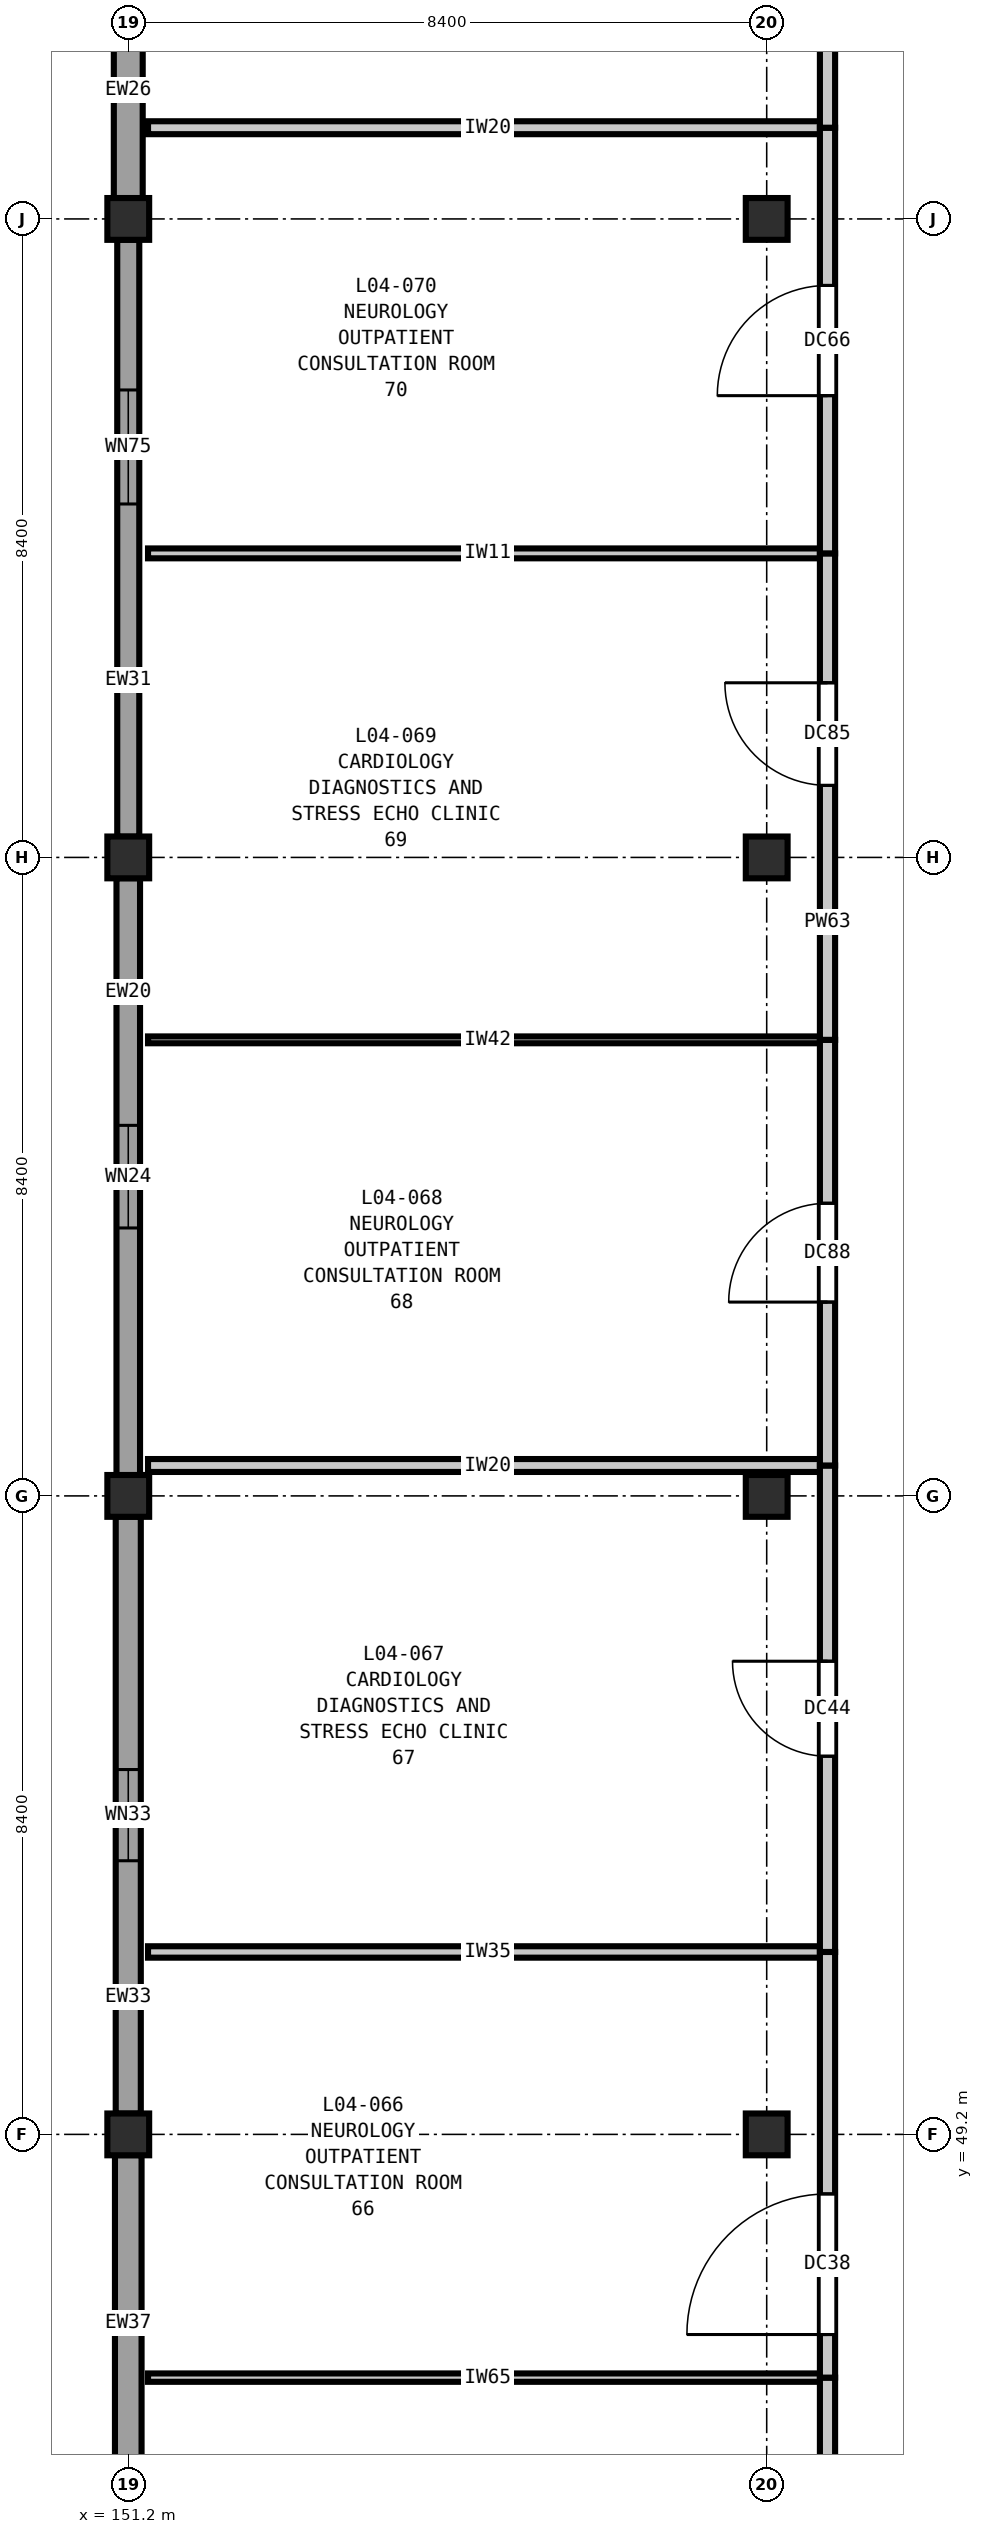
"""IFC4 building model, lengths in metres.
Left out: names, types, materials, properties, quantities, classifications, styles, units other than length and angle.
Written with IfcOpenShell. Run it as: python <this file> out.ifc"""

import sys

from ifc_helpers import new_model, si_unit, direction, frame, frame_2d, origin, origin_2d, place, context, subcontext, project, spatial, rectangle, extrude, element, fill, save


model = new_model("IFC4")
c1 = context("Model", 3, precision=1e-05, world=origin(), true_north=direction((0.0, 1.0)))
c2 = subcontext(c1, "Body", "Model", "MODEL_VIEW")
j1 = project(units=[si_unit("LENGTHUNIT", "METRE"), si_unit("PLANEANGLEUNIT", "RADIAN")], contexts=[c1])
p1 = place(None, origin())
s1 = spatial("IfcSite", under=j1, at=p1, CompositionType="ELEMENT")
p2 = place(p1, origin())
s2 = spatial("IfcBuilding", under=s1, at=p2, CompositionType="ELEMENT")
p3 = place(p2, frame((0.0, 0.0, 20.4)))
s3 = spatial("IfcBuildingStorey", under=s2, at=p3, CompositionType="ELEMENT", Elevation=20.4)
for number, where, z_axis, x_axis in (
    (1, (151.2, 49.2, 0.0), (0.0, 0.0, 1.0), (1.0, 0.0, 0.0)),
    (2, (151.2, 57.6, 0.0), (0.0, 0.0, 1.0), (1.0, 0.0, 0.0)),
    (3, (151.2, 66.0, 0.0), (0.0, 0.0, 1.0), (1.0, 0.0, 0.0)),
    (4, (151.2, 74.4, 0.0), (0.0, 0.0, 1.0), (1.0, 0.0, 0.0)),
    (5, (159.6, 49.2, 0.0), (0.0, 0.0, 1.0), (1.0, 0.0, 0.0)),
    (6, (159.6, 57.6, 0.0), (0.0, 0.0, 1.0), (1.0, 0.0, 0.0)),
    (7, (159.6, 66.0, 0.0), (0.0, 0.0, 1.0), (1.0, 0.0, 0.0)),
    (8, (159.6, 74.4, 0.0), (0.0, 0.0, 1.0), (1.0, 0.0, 0.0)),
):
    element("IfcColumn", number, at=place(p3, frame(where, z_axis=z_axis, x_axis=x_axis)), inside=s3, PredefinedType="COLUMN", context=c2, shape_type="SweptSolid", body=[
        extrude(rectangle(XDim=0.55, YDim=0.55, at=origin_2d()), origin(), (0.0, 0.0, 1.0), 4.2),
    ])
p4 = place(p3, frame((151.2, 41.073, 0.0), z_axis=(0.0, 0.0, 1.0), x_axis=(0.0, 1.0, 0.0)))
e9 = element("IfcWall", 9, at=p4, inside=s3, PredefinedType="SOLIDWALL", context=c2, shape_type="SweptSolid", body=[
    extrude(rectangle(XDim=7.854, YDim=0.35, at=frame_2d((3.927, 0.0))), origin(), (0.0, 0.0, 1.0), 3.48),
])
p5 = place(p4, frame((2.089, 0.0, 0.9)))
e10 = element("IfcOpeningElement", 10, at=p5, cuts=e9, PredefinedType="OPENING", context=c2, shape_type="SweptSolid", body=[
    extrude(rectangle(XDim=1.1, YDim=1.55, at=frame_2d((0.55, 0.775))), frame((0.0, 0.185, 0.0), z_axis=(0.0, -1.0, 0.0), x_axis=(1.0, 0.0, 0.0)), (0.0, 0.0, 1.0), 0.37),
])
p6 = place(p3, frame((151.2, 49.473, 0.0), z_axis=(0.0, 0.0, 1.0), x_axis=(0.0, 1.0, 0.0)))
e11 = element("IfcWall", 11, at=p6, inside=s3, PredefinedType="SOLIDWALL", context=c2, shape_type="SweptSolid", body=[
    extrude(rectangle(XDim=7.854, YDim=0.33, at=frame_2d((3.927, 0.0))), origin(), (0.0, 0.0, 1.0), 3.48),
])
p7 = place(p6, frame((3.327, 0.0, 0.9)))
e12 = element("IfcOpeningElement", 12, at=p7, cuts=e11, PredefinedType="OPENING", context=c2, shape_type="SweptSolid", body=[
    extrude(rectangle(XDim=1.2, YDim=1.55, at=frame_2d((0.6, 0.775))), frame((0.0, 0.175, 0.0), z_axis=(0.0, -1.0, 0.0), x_axis=(1.0, 0.0, 0.0)), (0.0, 0.0, 1.0), 0.35),
])
p8 = place(p3, frame((151.2, 57.873, 0.0), z_axis=(0.0, 0.0, 1.0), x_axis=(0.0, 1.0, 0.0)))
e13 = element("IfcWall", 13, at=p8, inside=s3, PredefinedType="SOLIDWALL", context=c2, shape_type="SweptSolid", body=[
    extrude(rectangle(XDim=7.854, YDim=0.31, at=frame_2d((3.927, 0.0))), origin(), (0.0, 0.0, 1.0), 3.48),
])
p9 = place(p8, frame((3.252, 0.0, 0.9)))
e14 = element("IfcOpeningElement", 14, at=p9, cuts=e13, PredefinedType="OPENING", context=c2, shape_type="SweptSolid", body=[
    extrude(rectangle(XDim=1.35, YDim=1.55, at=frame_2d((0.675, 0.775))), frame((0.0, 0.165, 0.0), z_axis=(0.0, -1.0, 0.0), x_axis=(1.0, 0.0, 0.0)), (0.0, 0.0, 1.0), 0.33),
])
p10 = place(p3, frame((151.2, 66.273, 0.0), z_axis=(0.0, 0.0, 1.0), x_axis=(0.0, 1.0, 0.0)))
e15 = element("IfcWall", 15, at=p10, inside=s3, PredefinedType="SOLIDWALL", context=c2, shape_type="SweptSolid", body=[
    extrude(rectangle(XDim=7.854, YDim=0.29, at=frame_2d((3.927, 0.0))), origin(), (0.0, 0.0, 1.0), 3.48),
])
p11 = place(p10, frame((4.377, 0.0, 0.9)))
e16 = element("IfcOpeningElement", 16, at=p11, cuts=e15, PredefinedType="OPENING", context=c2, shape_type="SweptSolid", body=[
    extrude(rectangle(XDim=1.5, YDim=1.55, at=frame_2d((0.75, 0.775))), frame((0.0, 0.155, 0.0), z_axis=(0.0, -1.0, 0.0), x_axis=(1.0, 0.0, 0.0)), (0.0, 0.0, 1.0), 0.31),
])
p12 = place(p3, frame((151.2, 74.673, 0.0), z_axis=(0.0, 0.0, 1.0), x_axis=(0.0, 1.0, 0.0)))
e17 = element("IfcWall", 17, at=p12, inside=s3, PredefinedType="SOLIDWALL", context=c2, shape_type="SweptSolid", body=[
    extrude(rectangle(XDim=7.854, YDim=0.38, at=frame_2d((3.927, 0.0))), origin(), (0.0, 0.0, 1.0), 3.48),
])
p13 = place(p12, frame((3.102, 0.0, 0.9)))
e18 = element("IfcOpeningElement", 18, at=p13, cuts=e17, PredefinedType="OPENING", context=c2, shape_type="SweptSolid", body=[
    extrude(rectangle(XDim=1.65, YDim=1.55, at=frame_2d((0.825, 0.775))), frame((0.0, 0.2, 0.0), z_axis=(0.0, -1.0, 0.0), x_axis=(1.0, 0.0, 0.0)), (0.0, 0.0, 1.0), 0.4),
])
p14 = place(p3, frame((151.46, 46.0, 0.0), z_axis=(0.0, 0.0, 1.0), x_axis=(1.0, 0.0, 0.0)))
e19 = element("IfcWall", 19, at=p14, inside=s3, PredefinedType="PARTITIONING", context=c2, shape_type="SweptSolid", body=[
    extrude(rectangle(XDim=8.94, YDim=0.11, at=frame_2d((4.47, 0.0))), origin(), (0.0, 0.0, 1.0), 3.82),
])
p15 = place(p3, frame((151.46, 51.6, 0.0), z_axis=(0.0, 0.0, 1.0), x_axis=(1.0, 0.0, 0.0)))
e20 = element("IfcWall", 20, at=p15, inside=s3, PredefinedType="PARTITIONING", context=c2, shape_type="SweptSolid", body=[
    extrude(rectangle(XDim=8.94, YDim=0.15, at=frame_2d((4.47, 0.0))), origin(), (0.0, 0.0, 1.0), 3.82),
])
p16 = place(p3, frame((151.46, 58.0, 0.0), z_axis=(0.0, 0.0, 1.0), x_axis=(1.0, 0.0, 0.0)))
e21 = element("IfcWall", 21, at=p16, inside=s3, PredefinedType="PARTITIONING", context=c2, shape_type="SweptSolid", body=[
    extrude(rectangle(XDim=8.94, YDim=0.17, at=frame_2d((4.47, 0.0))), origin(), (0.0, 0.0, 1.0), 3.82),
])
p17 = place(p3, frame((151.46, 63.6, 0.0), z_axis=(0.0, 0.0, 1.0), x_axis=(1.0, 0.0, 0.0)))
e22 = element("IfcWall", 22, at=p17, inside=s3, PredefinedType="PARTITIONING", context=c2, shape_type="SweptSolid", body=[
    extrude(rectangle(XDim=8.94, YDim=0.09, at=frame_2d((4.47, 0.0))), origin(), (0.0, 0.0, 1.0), 3.82),
])
p18 = place(p3, frame((151.46, 70.0, 0.0), z_axis=(0.0, 0.0, 1.0), x_axis=(1.0, 0.0, 0.0)))
e23 = element("IfcWall", 23, at=p18, inside=s3, PredefinedType="PARTITIONING", context=c2, shape_type="SweptSolid", body=[
    extrude(rectangle(XDim=8.94, YDim=0.13, at=frame_2d((4.47, 0.0))), origin(), (0.0, 0.0, 1.0), 3.82),
])
p19 = place(p3, frame((151.46, 75.6, 0.0), z_axis=(0.0, 0.0, 1.0), x_axis=(1.0, 0.0, 0.0)))
e24 = element("IfcWall", 24, at=p19, inside=s3, PredefinedType="PARTITIONING", context=c2, shape_type="SweptSolid", body=[
    extrude(rectangle(XDim=8.94, YDim=0.17, at=frame_2d((4.47, 0.0))), origin(), (0.0, 0.0, 1.0), 3.82),
])
p20 = place(p3, frame((160.4, 39.6, 0.0), z_axis=(0.0, 0.0, 1.0), x_axis=(0.0, 1.0, 0.0)))
e25 = element("IfcWall", 25, at=p20, inside=s3, PredefinedType="PARTITIONING", context=c2, shape_type="SweptSolid", body=[
    extrude(rectangle(XDim=6.4, YDim=0.2, at=frame_2d((3.2, 0.0))), origin(), (0.0, 0.0, 1.0), 3.82),
])
p21 = place(p20, frame((2.35, 0.0, 0.0)))
e26 = element("IfcOpeningElement", 26, at=p21, cuts=e25, PredefinedType="OPENING", context=c2, shape_type="SweptSolid", body=[
    extrude(rectangle(XDim=1.7, YDim=2.3, at=frame_2d((0.85, 1.15))), frame((0.0, 0.11, 0.0), z_axis=(0.0, -1.0, 0.0), x_axis=(1.0, 0.0, 0.0)), (0.0, 0.0, 1.0), 0.22),
])
p22 = place(p3, frame((160.4, 46.0, 0.0), z_axis=(0.0, 0.0, 1.0), x_axis=(0.0, 1.0, 0.0)))
e27 = element("IfcWall", 27, at=p22, inside=s3, PredefinedType="PARTITIONING", context=c2, shape_type="SweptSolid", body=[
    extrude(rectangle(XDim=5.6, YDim=0.2, at=frame_2d((2.8, 0.0))), origin(), (0.0, 0.0, 1.0), 3.82),
])
p23 = place(p22, frame((0.567, 0.0, 0.0)))
e28 = element("IfcOpeningElement", 28, at=p23, cuts=e27, PredefinedType="OPENING", context=c2, shape_type="SweptSolid", body=[
    extrude(rectangle(XDim=1.85, YDim=2.3, at=frame_2d((0.925, 1.15))), frame((0.0, 0.11, 0.0), z_axis=(0.0, -1.0, 0.0), x_axis=(1.0, 0.0, 0.0)), (0.0, 0.0, 1.0), 0.22),
])
p24 = place(p3, frame((160.4, 51.6, 0.0), z_axis=(0.0, 0.0, 1.0), x_axis=(0.0, 1.0, 0.0)))
e29 = element("IfcWall", 29, at=p24, inside=s3, PredefinedType="PARTITIONING", context=c2, shape_type="SweptSolid", body=[
    extrude(rectangle(XDim=6.4, YDim=0.2, at=frame_2d((3.2, 0.0))), origin(), (0.0, 0.0, 1.0), 3.82),
])
p25 = place(p24, frame((2.575, 0.0, 0.0)))
e30 = element("IfcOpeningElement", 30, at=p25, cuts=e29, PredefinedType="OPENING", context=c2, shape_type="SweptSolid", body=[
    extrude(rectangle(XDim=1.25, YDim=2.15, at=frame_2d((0.625, 1.075))), frame((0.0, 0.11, 0.0), z_axis=(0.0, -1.0, 0.0), x_axis=(1.0, 0.0, 0.0)), (0.0, 0.0, 1.0), 0.22),
])
p26 = place(p3, frame((160.4, 58.0, 0.0), z_axis=(0.0, 0.0, 1.0), x_axis=(0.0, 1.0, 0.0)))
e31 = element("IfcWall", 31, at=p26, inside=s3, PredefinedType="PARTITIONING", context=c2, shape_type="SweptSolid", body=[
    extrude(rectangle(XDim=5.6, YDim=0.2, at=frame_2d((2.8, 0.0))), origin(), (0.0, 0.0, 1.0), 3.82),
])
p27 = place(p26, frame((2.15, 0.0, 0.0)))
e32 = element("IfcOpeningElement", 32, at=p27, cuts=e31, PredefinedType="OPENING", context=c2, shape_type="SweptSolid", body=[
    extrude(rectangle(XDim=1.3, YDim=2.2, at=frame_2d((0.65, 1.1))), frame((0.0, 0.11, 0.0), z_axis=(0.0, -1.0, 0.0), x_axis=(1.0, 0.0, 0.0)), (0.0, 0.0, 1.0), 0.22),
])
p28 = place(p3, frame((160.4, 63.6, 0.0), z_axis=(0.0, 0.0, 1.0), x_axis=(0.0, 1.0, 0.0)))
e33 = element("IfcWall", 33, at=p28, inside=s3, PredefinedType="PARTITIONING", context=c2, shape_type="SweptSolid", body=[
    extrude(rectangle(XDim=6.4, YDim=0.2, at=frame_2d((3.2, 0.0))), origin(), (0.0, 0.0, 1.0), 3.82),
])
p29 = place(p28, frame((3.348, 0.0, 0.0)))
e34 = element("IfcOpeningElement", 34, at=p29, cuts=e33, PredefinedType="OPENING", context=c2, shape_type="SweptSolid", body=[
    extrude(rectangle(XDim=1.35, YDim=2.2, at=frame_2d((0.675, 1.1))), frame((0.0, 0.11, 0.0), z_axis=(0.0, -1.0, 0.0), x_axis=(1.0, 0.0, 0.0)), (0.0, 0.0, 1.0), 0.22),
])
p30 = place(p3, frame((160.4, 70.0, 0.0), z_axis=(0.0, 0.0, 1.0), x_axis=(0.0, 1.0, 0.0)))
e35 = element("IfcWall", 35, at=p30, inside=s3, PredefinedType="PARTITIONING", context=c2, shape_type="SweptSolid", body=[
    extrude(rectangle(XDim=5.6, YDim=0.2, at=frame_2d((2.8, 0.0))), origin(), (0.0, 0.0, 1.0), 3.82),
])
p31 = place(p30, frame((2.075, 0.0, 0.0)))
e36 = element("IfcOpeningElement", 36, at=p31, cuts=e35, PredefinedType="OPENING", context=c2, shape_type="SweptSolid", body=[
    extrude(rectangle(XDim=1.45, YDim=2.25, at=frame_2d((0.725, 1.125))), frame((0.0, 0.11, 0.0), z_axis=(0.0, -1.0, 0.0), x_axis=(1.0, 0.0, 0.0)), (0.0, 0.0, 1.0), 0.22),
])
p32 = place(p3, frame((160.4, 75.6, 0.0), z_axis=(0.0, 0.0, 1.0), x_axis=(0.0, 1.0, 0.0)))
e37 = element("IfcWall", 37, at=p32, inside=s3, PredefinedType="PARTITIONING", context=c2, shape_type="SweptSolid", body=[
    extrude(rectangle(XDim=7.2, YDim=0.2, at=frame_2d((3.6, 0.0))), origin(), (0.0, 0.0, 1.0), 3.82),
])
p33 = place(p32, frame((2.825, 0.0, 0.0)))
e38 = element("IfcOpeningElement", 38, at=p33, cuts=e37, PredefinedType="OPENING", context=c2, shape_type="SweptSolid", body=[
    extrude(rectangle(XDim=1.55, YDim=2.25, at=frame_2d((0.775, 1.125))), frame((0.0, 0.11, 0.0), z_axis=(0.0, -1.0, 0.0), x_axis=(1.0, 0.0, 0.0)), (0.0, 0.0, 1.0), 0.22),
])
p34 = place(p7, origin())
e39 = element("IfcWindow", 39, at=p34, inside=s3, PartitioningType="SINGLE_PANEL", PredefinedType="WINDOW", context=c2, shape_type="SweptSolid", body=[
    extrude(rectangle(XDim=1.2, YDim=1.55, at=frame_2d((0.6, 0.775))), frame((0.0, 0.03, 0.0), z_axis=(0.0, -1.0, 0.0), x_axis=(1.0, 0.0, 0.0)), (0.0, 0.0, 1.0), 0.06),
])
fill(e12, e39)
p35 = place(p9, origin())
e40 = element("IfcWindow", 40, at=p35, inside=s3, PartitioningType="SINGLE_PANEL", PredefinedType="WINDOW", context=c2, shape_type="SweptSolid", body=[
    extrude(rectangle(XDim=1.35, YDim=1.55, at=frame_2d((0.675, 0.775))), frame((0.0, 0.03, 0.0), z_axis=(0.0, -1.0, 0.0), x_axis=(1.0, 0.0, 0.0)), (0.0, 0.0, 1.0), 0.06),
])
fill(e14, e40)
p36 = place(p11, origin())
e41 = element("IfcWindow", 41, at=p36, inside=s3, PartitioningType="SINGLE_PANEL", PredefinedType="WINDOW", context=c2, shape_type="SweptSolid", body=[
    extrude(rectangle(XDim=1.5, YDim=1.55, at=frame_2d((0.75, 0.775))), frame((0.0, 0.03, 0.0), z_axis=(0.0, -1.0, 0.0), x_axis=(1.0, 0.0, 0.0)), (0.0, 0.0, 1.0), 0.06),
])
fill(e16, e41)
p37 = place(p23, origin())
e42 = element("IfcDoor", 42, at=p37, inside=s3, OperationType="SINGLE_SWING_LEFT", PredefinedType="DOOR", context=c2, shape_type="SweptSolid", body=[
    extrude(rectangle(XDim=1.85, YDim=2.3, at=frame_2d((0.925, 1.15))), frame((0.0, 0.025, 0.0), z_axis=(0.0, -1.0, 0.0), x_axis=(1.0, 0.0, 0.0)), (0.0, 0.0, 1.0), 0.05),
])
fill(e28, e42)
p38 = place(p25, origin())
e43 = element("IfcDoor", 43, at=p38, inside=s3, OperationType="SINGLE_SWING_RIGHT", PredefinedType="DOOR", context=c2, shape_type="SweptSolid", body=[
    extrude(rectangle(XDim=1.25, YDim=2.15, at=frame_2d((0.625, 1.075))), frame((0.0, 0.025, 0.0), z_axis=(0.0, -1.0, 0.0), x_axis=(1.0, 0.0, 0.0)), (0.0, 0.0, 1.0), 0.05),
])
fill(e30, e43)
p39 = place(p27, origin())
e44 = element("IfcDoor", 44, at=p39, inside=s3, OperationType="SINGLE_SWING_LEFT", PredefinedType="DOOR", context=c2, shape_type="SweptSolid", body=[
    extrude(rectangle(XDim=1.3, YDim=2.2, at=frame_2d((0.65, 1.1))), frame((0.0, 0.025, 0.0), z_axis=(0.0, -1.0, 0.0), x_axis=(1.0, 0.0, 0.0)), (0.0, 0.0, 1.0), 0.05),
])
fill(e32, e44)
p40 = place(p29, origin())
e45 = element("IfcDoor", 45, at=p40, inside=s3, OperationType="SINGLE_SWING_RIGHT", PredefinedType="DOOR", context=c2, shape_type="SweptSolid", body=[
    extrude(rectangle(XDim=1.35, YDim=2.2, at=frame_2d((0.675, 1.1))), frame((0.0, 0.025, 0.0), z_axis=(0.0, -1.0, 0.0), x_axis=(1.0, 0.0, 0.0)), (0.0, 0.0, 1.0), 0.05),
])
fill(e34, e45)
p41 = place(p31, origin())
e46 = element("IfcDoor", 46, at=p41, inside=s3, OperationType="SINGLE_SWING_LEFT", PredefinedType="DOOR", context=c2, shape_type="SweptSolid", body=[
    extrude(rectangle(XDim=1.45, YDim=2.25, at=frame_2d((0.725, 1.125))), frame((0.0, 0.025, 0.0), z_axis=(0.0, -1.0, 0.0), x_axis=(1.0, 0.0, 0.0)), (0.0, 0.0, 1.0), 0.05),
])
fill(e36, e46)
save(model, sys.argv[1])
